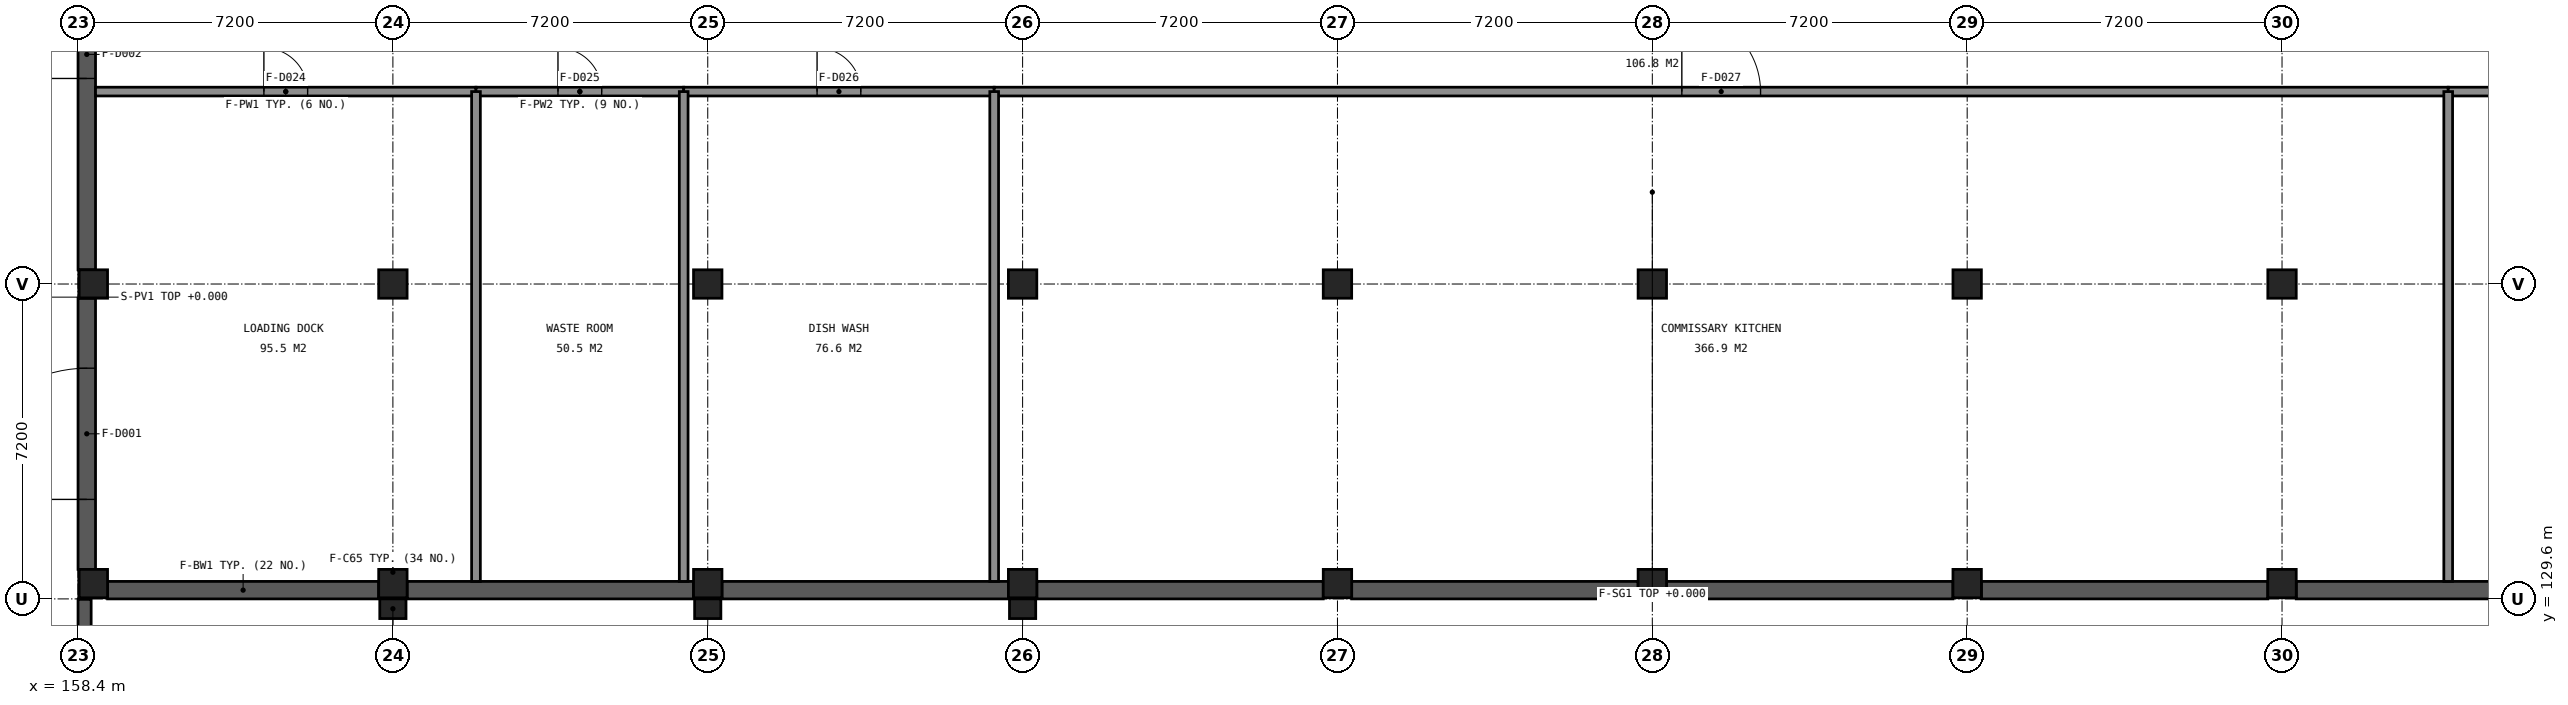
"""IFC4 building model, lengths in metres.
Left out: names, types, materials, properties, quantities, classifications, styles, units other than length and angle.
Written with IfcOpenShell. Run it as: python <this file> out.ifc"""

import sys

from ifc_helpers import new_model, si_unit, direction, frame, frame_2d, origin, origin_2d, place, context, subcontext, project, spatial, polyline, rectangle, outline, extrude, element, fill, save


model = new_model("IFC4")
c1 = context("Model", 3, precision=1e-05, world=origin(), true_north=direction((0.0, 1.0)))
c2 = subcontext(c1, "Body", "Model", "MODEL_VIEW")
j1 = project(units=[si_unit("LENGTHUNIT", "METRE"), si_unit("PLANEANGLEUNIT", "RADIAN")], contexts=[c1])
p1 = place(None, origin())
s1 = spatial("IfcSite", under=j1, at=p1, CompositionType="ELEMENT")
p2 = place(p1, origin())
s2 = spatial("IfcBuilding", under=s1, at=p2, CompositionType="ELEMENT")
p3 = place(p2, origin())
s3 = spatial("IfcBuildingStorey", under=s2, at=p3, CompositionType="ELEMENT", Elevation=0.0)
for number, where, z_axis, x_axis in (
    (1, (158.75, 129.95, -0.3), (0.0, 0.0, 1.0), (1.0, 0.0, 0.0)),
    (2, (165.6, 129.95, -0.3), (0.0, 0.0, 1.0), (1.0, 0.0, 0.0)),
    (3, (172.8, 129.95, -0.3), (0.0, 0.0, 1.0), (1.0, 0.0, 0.0)),
    (4, (180.0, 129.95, -0.3), (0.0, 0.0, 1.0), (1.0, 0.0, 0.0)),
    (5, (187.2, 129.95, -0.3), (0.0, 0.0, 1.0), (1.0, 0.0, 0.0)),
    (6, (194.4, 129.95, -0.3), (0.0, 0.0, 1.0), (1.0, 0.0, 0.0)),
    (7, (201.6, 129.95, -0.3), (0.0, 0.0, 1.0), (1.0, 0.0, 0.0)),
    (8, (208.8, 129.95, -0.3), (0.0, 0.0, 1.0), (1.0, 0.0, 0.0)),
    (9, (158.75, 136.8, -0.3), (0.0, 0.0, 1.0), (1.0, 0.0, 0.0)),
    (10, (165.6, 136.8, -0.3), (0.0, 0.0, 1.0), (1.0, 0.0, 0.0)),
    (11, (172.8, 136.8, -0.3), (0.0, 0.0, 1.0), (1.0, 0.0, 0.0)),
    (12, (180.0, 136.8, -0.3), (0.0, 0.0, 1.0), (1.0, 0.0, 0.0)),
    (13, (187.2, 136.8, -0.3), (0.0, 0.0, 1.0), (1.0, 0.0, 0.0)),
    (14, (194.4, 136.8, -0.3), (0.0, 0.0, 1.0), (1.0, 0.0, 0.0)),
    (15, (201.6, 136.8, -0.3), (0.0, 0.0, 1.0), (1.0, 0.0, 0.0)),
    (16, (208.8, 136.8, -0.3), (0.0, 0.0, 1.0), (1.0, 0.0, 0.0)),
):
    element("IfcColumn", number, at=place(p3, frame(where, z_axis=z_axis, x_axis=x_axis)), inside=s3, PredefinedType="COLUMN", context=c2, shape_type="SweptSolid", body=[
        extrude(rectangle(XDim=0.65, YDim=0.65, at=origin_2d()), origin(), (0.0, 0.0, 1.0), 5.1),
    ])
p4 = place(p3, frame((165.275, 129.8, -0.3), z_axis=(0.0, 0.0, 1.0), x_axis=(-1.0, 0.0, 0.0)))
e17 = element("IfcWall", 17, at=p4, inside=s3, PredefinedType="SHEAR", context=c2, shape_type="SweptSolid", body=[
    extrude(rectangle(XDim=6.2, YDim=0.4, at=frame_2d((3.1, 0.0))), origin(), (0.0, 0.0, 1.0), 4.25),
])
for number, where, z_axis, x_axis in (
    (18, (172.475, 129.8, -0.3), (0.0, 0.0, 1.0), (-1.0, 0.0, 0.0)),
    (19, (179.675, 129.8, -0.3), (0.0, 0.0, 1.0), (-1.0, 0.0, 0.0)),
    (20, (186.875, 129.8, -0.3), (0.0, 0.0, 1.0), (-1.0, 0.0, 0.0)),
    (21, (194.075, 129.8, -0.3), (0.0, 0.0, 1.0), (-1.0, 0.0, 0.0)),
):
    element("IfcWall", number, at=place(p3, frame(where, z_axis=z_axis, x_axis=x_axis)), inside=s3, PredefinedType="SHEAR", context=c2, shape_type="SweptSolid", body=[
        extrude(rectangle(XDim=6.55, YDim=0.4, at=frame_2d((3.275, 0.0))), origin(), (0.0, 0.0, 1.0), 4.25),
    ])
p5 = place(p3, frame((201.275, 129.8, -0.3), z_axis=(0.0, 0.0, 1.0), x_axis=(-1.0, 0.0, 0.0)))
e22 = element("IfcWall", 22, at=p5, inside=s3, PredefinedType="SHEAR", context=c2, shape_type="SweptSolid", body=[
    extrude(rectangle(XDim=6.55, YDim=0.4, at=frame_2d((3.275, 0.0))), origin(), (0.0, 0.0, 1.0), 4.25),
])
for number, where, z_axis, x_axis in (
    (23, (208.475, 129.8, -0.3), (0.0, 0.0, 1.0), (-1.0, 0.0, 0.0)),
    (24, (215.675, 129.8, -0.3), (0.0, 0.0, 1.0), (-1.0, 0.0, 0.0)),
):
    element("IfcWall", number, at=place(p3, frame(where, z_axis=z_axis, x_axis=x_axis)), inside=s3, PredefinedType="SHEAR", context=c2, shape_type="SweptSolid", body=[
        extrude(rectangle(XDim=6.55, YDim=0.4, at=frame_2d((3.275, 0.0))), origin(), (0.0, 0.0, 1.0), 4.25),
    ])
p6 = place(p3, frame((158.6, 130.275, -0.3), z_axis=(0.0, 0.0, 1.0), x_axis=(0.0, 1.0, 0.0)))
e25 = element("IfcWall", 25, at=p6, inside=s3, PredefinedType="SHEAR", context=c2, shape_type="SweptSolid", body=[
    extrude(rectangle(XDim=6.2, YDim=0.4, at=frame_2d((3.1, 0.0))), origin(), (0.0, 0.0, 1.0), 4.25),
])
p7 = place(p6, frame((1.6, 0.0, 0.3)))
e26 = element("IfcOpeningElement", 26, at=p7, cuts=e25, PredefinedType="OPENING", context=c2, shape_type="SweptSolid", body=[
    extrude(rectangle(XDim=3.0, YDim=3.0, at=frame_2d((1.5, 1.5))), frame((0.0, 0.21, 0.0), z_axis=(0.0, -1.0, 0.0), x_axis=(1.0, 0.0, 0.0)), (0.0, 0.0, 1.0), 0.42),
])
p8 = place(p3, frame((158.6, 137.125, -0.3), z_axis=(0.0, 0.0, 1.0), x_axis=(0.0, 1.0, 0.0)))
e27 = element("IfcWall", 27, at=p8, inside=s3, PredefinedType="SHEAR", context=c2, shape_type="SweptSolid", body=[
    extrude(rectangle(XDim=6.075, YDim=0.4, at=frame_2d((3.038, 0.0))), origin(), (0.0, 0.0, 1.0), 4.25),
])
p9 = place(p8, frame((4.375, 0.0, 0.3)))
e28 = element("IfcOpeningElement", 28, at=p9, cuts=e27, PredefinedType="OPENING", context=c2, shape_type="SweptSolid", body=[
    extrude(rectangle(XDim=1.1, YDim=2.1, at=frame_2d((0.55, 1.05))), frame((0.0, 0.21, 0.0), z_axis=(0.0, -1.0, 0.0), x_axis=(1.0, 0.0, 0.0)), (0.0, 0.0, 1.0), 0.42),
])
p10 = place(p3, frame((158.55, 123.958, -0.25), z_axis=(0.0, 0.0, 1.0), x_axis=(0.0, 1.0, 0.0)))
e29 = element("IfcWall", 29, at=p10, inside=s3, PredefinedType="SOLIDWALL", context=c2, shape_type="SweptSolid", body=[
    extrude(rectangle(XDim=5.632, YDim=0.3, at=frame_2d((2.816, 0.0))), origin(), (0.0, 0.0, 1.0), 2.55),
])
p11 = place(p3, frame((0.0, 0.0, 2.1)))
e30 = element("IfcWall", 30, at=p11, inside=s3, PredefinedType="SOLIDWALL", context=c2, shape_type="SweptSolid", body=[
    extrude(outline(polyline([(171.673, 128.776), (170.114, 129.35), (168.294, 129.35), (169.149, 129.066), (171.453, 128.218), (171.673, 128.776)])), origin(), (0.0, 0.0, 1.0), 2.6),
])
p12 = place(p3, frame((0.0, 0.0, 3.3)))
e31 = element("IfcWall", 31, at=p12, inside=s3, PredefinedType="SOLIDWALL", context=c2, shape_type="SweptSolid", body=[
    extrude(outline(polyline([(181.383, 128.452), (179.8, 129.35), (178.551, 129.35), (179.049, 129.086), (181.077, 127.937), (181.383, 128.452)])), origin(), (0.0, 0.0, 1.0), 2.6),
])
for number, where, z_axis, x_axis in (
    (32, (165.6, 129.375, -0.3), (0.0, 0.0, 1.0), (1.0, 0.0, 0.0)),
    (33, (172.8, 129.375, -0.3), (0.0, 0.0, 1.0), (1.0, 0.0, 0.0)),
    (34, (180.0, 129.375, -0.3), (0.0, 0.0, 1.0), (1.0, 0.0, 0.0)),
):
    element("IfcColumn", number, at=place(p3, frame(where, z_axis=z_axis, x_axis=x_axis)), inside=s3, PredefinedType="PILASTER", context=c2, shape_type="SweptSolid", body=[
        extrude(rectangle(XDim=0.6, YDim=0.45, at=origin_2d()), origin(), (0.0, 0.0, 1.0), 5.1),
    ])
p13 = place(p3, frame((158.8, 141.2, 0.0), z_axis=(0.0, 0.0, 1.0), x_axis=(1.0, 0.0, 0.0)))
e35 = element("IfcWall", 35, at=p13, inside=s3, PredefinedType="PARTITIONING", context=c2, shape_type="SweptSolid", body=[
    extrude(rectangle(XDim=8.7, YDim=0.2, at=frame_2d((4.35, 0.0))), origin(), (0.0, 0.0, 1.0), 3.95),
])
p14 = place(p13, frame((3.85, 0.0, 0.0)))
e36 = element("IfcOpeningElement", 36, at=p14, cuts=e35, PredefinedType="OPENING", context=c2, shape_type="SweptSolid", body=[
    extrude(rectangle(XDim=1.0, YDim=2.1, at=frame_2d((0.5, 1.05))), frame((0.0, 0.11, 0.0), z_axis=(0.0, -1.0, 0.0), x_axis=(1.0, 0.0, 0.0)), (0.0, 0.0, 1.0), 0.22),
])
p15 = place(p3, frame((167.5, 141.2, 0.0), z_axis=(0.0, 0.0, 1.0), x_axis=(1.0, 0.0, 0.0)))
e37 = element("IfcWall", 37, at=p15, inside=s3, PredefinedType="PARTITIONING", context=c2, shape_type="SweptSolid", body=[
    extrude(rectangle(XDim=4.75, YDim=0.2, at=frame_2d((2.375, 0.0))), origin(), (0.0, 0.0, 1.0), 3.95),
])
p16 = place(p15, frame((1.875, 0.0, 0.0)))
e38 = element("IfcOpeningElement", 38, at=p16, cuts=e37, PredefinedType="OPENING", context=c2, shape_type="SweptSolid", body=[
    extrude(rectangle(XDim=1.0, YDim=2.1, at=frame_2d((0.5, 1.05))), frame((0.0, 0.11, 0.0), z_axis=(0.0, -1.0, 0.0), x_axis=(1.0, 0.0, 0.0)), (0.0, 0.0, 1.0), 0.22),
])
p17 = place(p3, frame((172.25, 141.2, 0.0), z_axis=(0.0, 0.0, 1.0), x_axis=(1.0, 0.0, 0.0)))
e39 = element("IfcWall", 39, at=p17, inside=s3, PredefinedType="PARTITIONING", context=c2, shape_type="SweptSolid", body=[
    extrude(rectangle(XDim=7.1, YDim=0.2, at=frame_2d((3.55, 0.0))), origin(), (0.0, 0.0, 1.0), 3.95),
])
p18 = place(p17, frame((3.05, 0.0, 0.0)))
e40 = element("IfcOpeningElement", 40, at=p18, cuts=e39, PredefinedType="OPENING", context=c2, shape_type="SweptSolid", body=[
    extrude(rectangle(XDim=1.0, YDim=2.1, at=frame_2d((0.5, 1.05))), frame((0.0, 0.11, 0.0), z_axis=(0.0, -1.0, 0.0), x_axis=(1.0, 0.0, 0.0)), (0.0, 0.0, 1.0), 0.22),
])
p19 = place(p3, frame((179.35, 141.2, 0.0), z_axis=(0.0, 0.0, 1.0), x_axis=(1.0, 0.0, 0.0)))
e41 = element("IfcWall", 41, at=p19, inside=s3, PredefinedType="PARTITIONING", context=c2, shape_type="SweptSolid", body=[
    extrude(rectangle(XDim=33.25, YDim=0.2, at=frame_2d((16.625, 0.0))), origin(), (0.0, 0.0, 1.0), 3.95),
])
p20 = place(p19, frame((15.725, 0.0, 0.0)))
e42 = element("IfcOpeningElement", 42, at=p20, cuts=e41, PredefinedType="OPENING", context=c2, shape_type="SweptSolid", body=[
    extrude(rectangle(XDim=1.8, YDim=2.1, at=frame_2d((0.9, 1.05))), frame((0.0, 0.11, 0.0), z_axis=(0.0, -1.0, 0.0), x_axis=(1.0, 0.0, 0.0)), (0.0, 0.0, 1.0), 0.22),
])
p21 = place(p3, frame((212.6, 141.2, 0.0), z_axis=(0.0, 0.0, 1.0), x_axis=(1.0, 0.0, 0.0)))
e43 = element("IfcWall", 43, at=p21, inside=s3, PredefinedType="PARTITIONING", context=c2, shape_type="SweptSolid", body=[
    extrude(rectangle(XDim=17.4, YDim=0.2, at=frame_2d((8.7, 0.0))), origin(), (0.0, 0.0, 1.0), 3.95),
])
p22 = place(p21, frame((8.2, 0.0, 0.0)))
e44 = element("IfcOpeningElement", 44, at=p22, cuts=e43, PredefinedType="OPENING", context=c2, shape_type="SweptSolid", body=[
    extrude(rectangle(XDim=1.0, YDim=2.1, at=frame_2d((0.5, 1.05))), frame((0.0, 0.11, 0.0), z_axis=(0.0, -1.0, 0.0), x_axis=(1.0, 0.0, 0.0)), (0.0, 0.0, 1.0), 0.22),
])
for number, where, z_axis, x_axis in (
    (45, (167.5, 130.0, 0.0), (0.0, 0.0, 1.0), (0.0, 1.0, 0.0)),
    (46, (172.25, 130.0, 0.0), (0.0, 0.0, 1.0), (0.0, 1.0, 0.0)),
    (47, (179.35, 130.0, 0.0), (0.0, 0.0, 1.0), (0.0, 1.0, 0.0)),
    (48, (212.6, 130.0, 0.0), (0.0, 0.0, 1.0), (0.0, 1.0, 0.0)),
):
    element("IfcWall", number, at=place(p3, frame(where, z_axis=z_axis, x_axis=x_axis)), inside=s3, PredefinedType="PARTITIONING", context=c2, shape_type="SweptSolid", body=[
        extrude(rectangle(XDim=11.2, YDim=0.2, at=frame_2d((5.6, 0.0))), origin(), (0.0, 0.0, 1.0), 3.95),
    ])
p23 = place(p7, origin())
e49 = element("IfcDoor", 49, at=p23, inside=s3, OperationType="ROLLINGUP", PredefinedType="DOOR", context=c2, shape_type="SweptSolid", body=[
    extrude(rectangle(XDim=3.0, YDim=3.0, at=frame_2d((1.5, 1.5))), frame((0.0, 0.025, 0.0), z_axis=(0.0, -1.0, 0.0), x_axis=(1.0, 0.0, 0.0)), (0.0, 0.0, 1.0), 0.05),
])
fill(e26, e49)
p24 = place(p9, origin())
e50 = element("IfcDoor", 50, at=p24, inside=s3, OperationType="NOTDEFINED", PredefinedType="DOOR", context=c2, shape_type="SweptSolid", body=[
    extrude(rectangle(XDim=1.1, YDim=2.1, at=frame_2d((0.55, 1.05))), frame((0.0, 0.025, 0.0), z_axis=(0.0, -1.0, 0.0), x_axis=(1.0, 0.0, 0.0)), (0.0, 0.0, 1.0), 0.05),
])
fill(e28, e50)
p25 = place(p14, origin())
e51 = element("IfcDoor", 51, at=p25, inside=s3, OperationType="NOTDEFINED", PredefinedType="DOOR", context=c2, shape_type="SweptSolid", body=[
    extrude(rectangle(XDim=1.0, YDim=2.1, at=frame_2d((0.5, 1.05))), frame((0.0, 0.025, 0.0), z_axis=(0.0, -1.0, 0.0), x_axis=(1.0, 0.0, 0.0)), (0.0, 0.0, 1.0), 0.05),
])
fill(e36, e51)
p26 = place(p16, origin())
e52 = element("IfcDoor", 52, at=p26, inside=s3, OperationType="NOTDEFINED", PredefinedType="DOOR", context=c2, shape_type="SweptSolid", body=[
    extrude(rectangle(XDim=1.0, YDim=2.1, at=frame_2d((0.5, 1.05))), frame((0.0, 0.025, 0.0), z_axis=(0.0, -1.0, 0.0), x_axis=(1.0, 0.0, 0.0)), (0.0, 0.0, 1.0), 0.05),
])
fill(e38, e52)
p27 = place(p18, origin())
e53 = element("IfcDoor", 53, at=p27, inside=s3, OperationType="NOTDEFINED", PredefinedType="DOOR", context=c2, shape_type="SweptSolid", body=[
    extrude(rectangle(XDim=1.0, YDim=2.1, at=frame_2d((0.5, 1.05))), frame((0.0, 0.025, 0.0), z_axis=(0.0, -1.0, 0.0), x_axis=(1.0, 0.0, 0.0)), (0.0, 0.0, 1.0), 0.05),
])
fill(e40, e53)
p28 = place(p20, origin())
e54 = element("IfcDoor", 54, at=p28, inside=s3, OperationType="NOTDEFINED", PredefinedType="DOOR", context=c2, shape_type="SweptSolid", body=[
    extrude(rectangle(XDim=1.8, YDim=2.1, at=frame_2d((0.9, 1.05))), frame((0.0, 0.025, 0.0), z_axis=(0.0, -1.0, 0.0), x_axis=(1.0, 0.0, 0.0)), (0.0, 0.0, 1.0), 0.05),
])
fill(e42, e54)
save(model, sys.argv[1])
